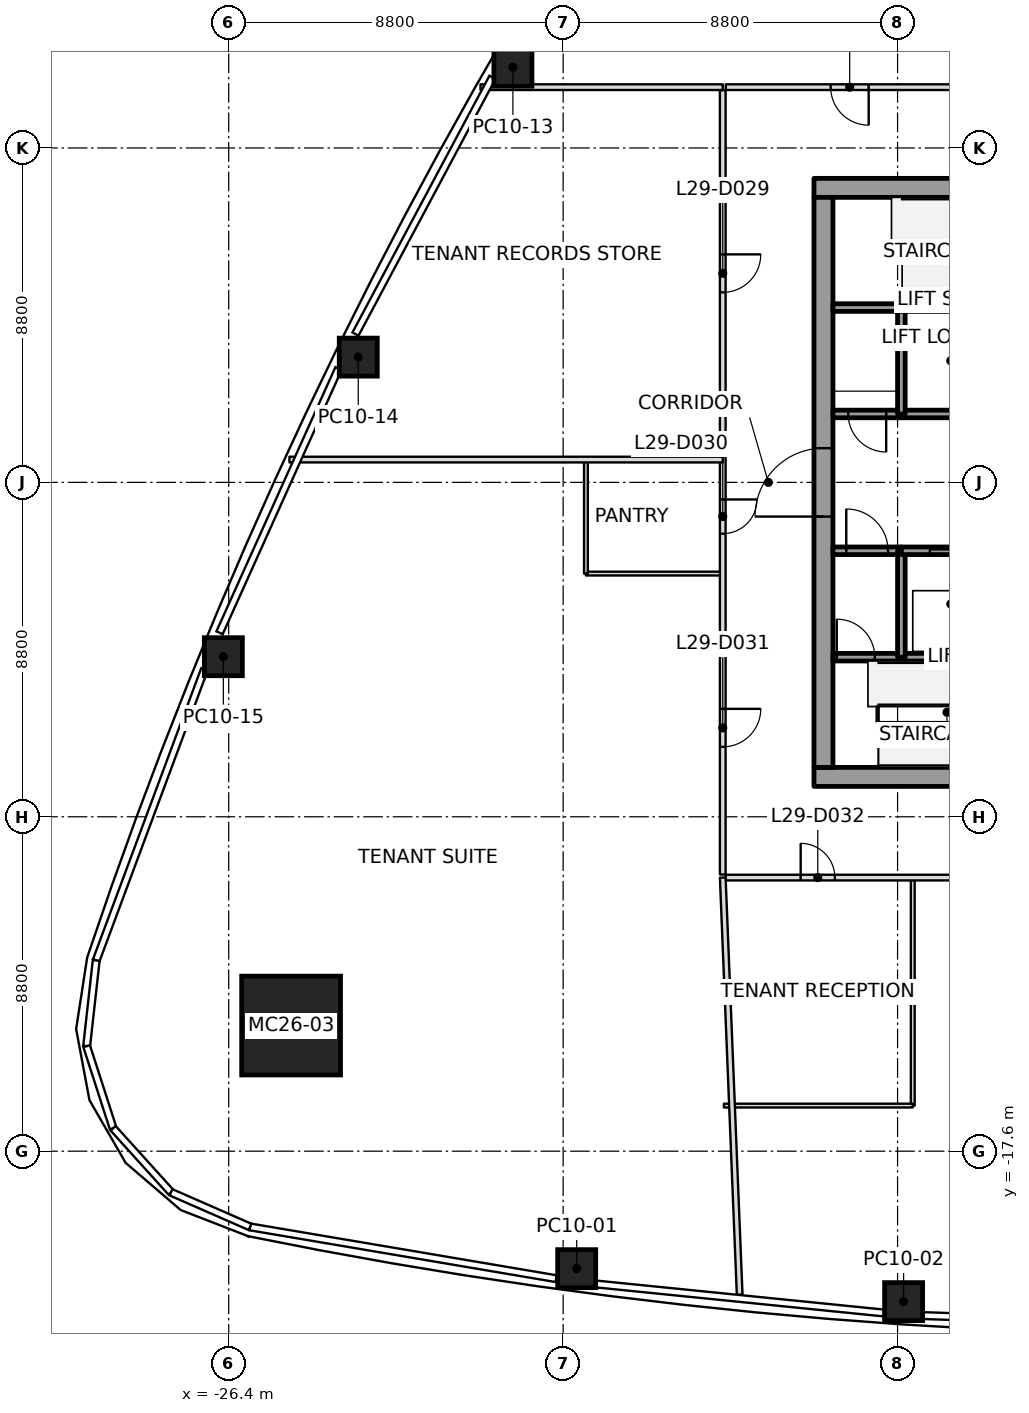
"""IFC4 building model, lengths in metres.
Left out: names, types, materials, properties, quantities, classifications, styles, units other than length and angle.
Written with IfcOpenShell. Run it as: python <this file> out.ifc"""

import sys

from ifc_helpers import new_model, si_unit, direction, frame, frame_2d, origin, origin_2d, place, context, subcontext, project, spatial, rectangle, extrude, element, fill, save


model = new_model("IFC4")
c1 = context("Model", 3, precision=1e-05, world=origin(), true_north=direction((0.0, 1.0)))
c2 = subcontext(c1, "Body", "Model", "MODEL_VIEW")
j1 = project(units=[si_unit("LENGTHUNIT", "METRE"), si_unit("PLANEANGLEUNIT", "RADIAN")], contexts=[c1])
p1 = place(None, origin())
s1 = spatial("IfcSite", under=j1, at=p1, CompositionType="ELEMENT")
p2 = place(p1, origin())
s2 = spatial("IfcBuilding", under=s1, at=p2, CompositionType="ELEMENT")
p3 = place(p2, frame((0.0, 0.0, 137.8)))
s3 = spatial("IfcBuildingStorey", under=s2, at=p3, CompositionType="ELEMENT", Elevation=137.8)
p4 = place(p3, frame((-24.758, -14.294, 0.0), z_axis=(0.02806141744, 0.01622681965, 0.999474485505), x_axis=(0.999606200887, -0.000455526946, -0.028057719863)))
e1 = element("IfcColumn", 1, at=p4, inside=s3, PredefinedType="COLUMN", context=c2, shape_type="SweptSolid", body=[
    extrude(rectangle(XDim=2.6, YDim=2.6, at=origin_2d()), origin(), (0.0, 0.0, 1.0), 4.002),
])
p5 = place(p3, frame((-17.243, -20.691, 0.0), z_axis=(0.017696459735, 0.010434809016, 0.999788952766), x_axis=(-0.990875185818, 0.133812553022, 0.016142081135)))
e2 = element("IfcColumn", 2, at=p5, inside=s3, PredefinedType="COLUMN", context=c2, shape_type="SweptSolid", body=[
    extrude(rectangle(XDim=1.0, YDim=1.0, at=origin_2d()), origin(), (0.0, 0.0, 1.0), 4.001),
])
p6 = place(p3, frame((-8.641, -21.559, 0.0), z_axis=(0.008849199152, 0.01116829962, 0.999898475225), x_axis=(-0.997716007081, 0.067063175126, 0.008080826415)))
e3 = element("IfcColumn", 3, at=p6, inside=s3, PredefinedType="COLUMN", context=c2, shape_type="SweptSolid", body=[
    extrude(rectangle(XDim=1.0, YDim=1.0, at=origin_2d()), origin(), (0.0, 0.0, 1.0), 4.0),
])
p7 = place(p3, frame((-18.921, 10.924, 0.0), z_axis=(0.009887049298, -0.00573692984, 0.999934664812), x_axis=(0.499975560967, 0.866039512843, 2.5126546e-05)))
e4 = element("IfcColumn", 4, at=p7, inside=s3, PredefinedType="COLUMN", context=c2, shape_type="SweptSolid", body=[
    extrude(rectangle(XDim=1.0, YDim=1.0, at=origin_2d()), origin(), (0.0, 0.0, 1.0), 4.0),
])
p8 = place(p3, frame((-22.991, 3.296, 0.0), z_axis=(0.014158706356, 0.002074982828, 0.999897607498), x_axis=(0.440836713602, 0.897550724125, -0.008104909801)))
e5 = element("IfcColumn", 5, at=p8, inside=s3, PredefinedType="COLUMN", context=c2, shape_type="SweptSolid", body=[
    extrude(rectangle(XDim=1.0, YDim=1.0, at=origin_2d()), origin(), (0.0, 0.0, 1.0), 4.0),
])
p9 = place(p3, frame((-26.541, -4.587, 0.0), z_axis=(0.017940538146, 0.010068669368, 0.999788357098), x_axis=(0.379721200807, 0.92496035973, -0.016128936303)))
e6 = element("IfcColumn", 6, at=p9, inside=s3, PredefinedType="COLUMN", context=c2, shape_type="SweptSolid", body=[
    extrude(rectangle(XDim=1.0, YDim=1.0, at=origin_2d()), origin(), (0.0, 0.0, 1.0), 4.001),
])
p10 = place(p3, frame((-11.0, -7.75, 0.0), z_axis=(0.0, 0.0, 1.0), x_axis=(1.0, 0.0, 0.0)))
e7 = element("IfcWall", 7, at=p10, inside=s3, PredefinedType="SHEAR", context=c2, shape_type="SweptSolid", body=[
    extrude(rectangle(XDim=22.0, YDim=0.5, at=frame_2d((11.0, 0.0))), origin(), (0.0, 0.0, 1.0), 4.0),
])
p11 = place(p10, frame((10.45, 0.0, 0.0)))
e8 = element("IfcOpeningElement", 8, at=p11, cuts=e7, PredefinedType="OPENING", context=c2, shape_type="SweptSolid", body=[
    extrude(rectangle(XDim=1.1, YDim=2.1, at=frame_2d((0.55, 1.05))), frame((0.0, 0.25, 0.0), z_axis=(0.0, -1.0, 0.0), x_axis=(1.0, 0.0, 0.0)), (0.0, 0.0, 1.0), 0.5),
])
p12 = place(p3, frame((-11.0, 7.75, 0.0), z_axis=(0.0, 0.0, 1.0), x_axis=(1.0, 0.0, 0.0)))
e9 = element("IfcWall", 9, at=p12, inside=s3, PredefinedType="SHEAR", context=c2, shape_type="SweptSolid", body=[
    extrude(rectangle(XDim=22.0, YDim=0.5, at=frame_2d((11.0, 0.0))), origin(), (0.0, 0.0, 1.0), 4.0),
])
p13 = place(p12, frame((10.45, 0.0, 0.0)))
e10 = element("IfcOpeningElement", 10, at=p13, cuts=e9, PredefinedType="OPENING", context=c2, shape_type="SweptSolid", body=[
    extrude(rectangle(XDim=1.1, YDim=2.1, at=frame_2d((0.55, 1.05))), frame((0.0, 0.25, 0.0), z_axis=(0.0, -1.0, 0.0), x_axis=(1.0, 0.0, 0.0)), (0.0, 0.0, 1.0), 0.5),
])
p14 = place(p3, frame((-10.75, -7.5, 0.0), z_axis=(0.0, 0.0, 1.0), x_axis=(0.0, 1.0, 0.0)))
e11 = element("IfcWall", 11, at=p14, inside=s3, PredefinedType="SHEAR", context=c2, shape_type="SweptSolid", body=[
    extrude(rectangle(XDim=15.0, YDim=0.5, at=frame_2d((7.5, 0.0))), origin(), (0.0, 0.0, 1.0), 4.0),
])
p15 = place(p14, frame((6.6, 0.0, 0.0)))
e12 = element("IfcOpeningElement", 12, at=p15, cuts=e11, PredefinedType="OPENING", context=c2, shape_type="SweptSolid", body=[
    extrude(rectangle(XDim=1.8, YDim=2.1, at=frame_2d((0.9, 1.05))), frame((0.0, 0.25, 0.0), z_axis=(0.0, -1.0, 0.0), x_axis=(1.0, 0.0, 0.0)), (0.0, 0.0, 1.0), 0.5),
])
p16 = place(p3, frame((-10.5, -4.6, 0.0), z_axis=(0.0, 0.0, 1.0), x_axis=(1.0, 0.0, 0.0)))
e13 = element("IfcWall", 13, at=p16, inside=s3, PredefinedType="SOLIDWALL", context=c2, shape_type="SweptSolid", body=[
    extrude(rectangle(XDim=1.8, YDim=0.2, at=frame_2d((0.9, 0.0))), origin(), (0.0, 0.0, 1.0), 3.85),
])
p17 = place(p16, frame((0.1, 0.0, 0.0)))
e14 = element("IfcOpeningElement", 14, at=p17, cuts=e13, PredefinedType="OPENING", context=c2, shape_type="SweptSolid", body=[
    extrude(rectangle(XDim=1.0, YDim=2.1, at=frame_2d((0.5, 1.05))), frame((0.0, 0.1, 0.0), z_axis=(0.0, -1.0, 0.0), x_axis=(1.0, 0.0, 0.0)), (0.0, 0.0, 1.0), 0.2),
])
p18 = place(p3, frame((-10.5, -1.8, 0.0), z_axis=(0.0, 0.0, 1.0), x_axis=(1.0, 0.0, 0.0)))
e15 = element("IfcWall", 15, at=p18, inside=s3, PredefinedType="SOLIDWALL", context=c2, shape_type="SweptSolid", body=[
    extrude(rectangle(XDim=1.8, YDim=0.2, at=frame_2d((0.9, 0.0))), origin(), (0.0, 0.0, 1.0), 3.85),
])
p19 = place(p18, frame((0.35, 0.0, 0.0)))
e16 = element("IfcOpeningElement", 16, at=p19, cuts=e15, PredefinedType="OPENING", context=c2, shape_type="SweptSolid", body=[
    extrude(rectangle(XDim=1.1, YDim=2.1, at=frame_2d((0.55, 1.05))), frame((0.0, 0.1, 0.0), z_axis=(0.0, -1.0, 0.0), x_axis=(1.0, 0.0, 0.0)), (0.0, 0.0, 1.0), 0.2),
])
p20 = place(p3, frame((-8.7, 1.8, 0.0), z_axis=(0.0, 0.0, 1.0), x_axis=(-1.0, 0.0, 0.0)))
e17 = element("IfcWall", 17, at=p20, inside=s3, PredefinedType="SOLIDWALL", context=c2, shape_type="SweptSolid", body=[
    extrude(rectangle(XDim=1.8, YDim=0.2, at=frame_2d((0.9, 0.0))), origin(), (0.0, 0.0, 1.0), 3.85),
])
p21 = place(p20, frame((0.4, 0.0, 0.0)))
e18 = element("IfcOpeningElement", 18, at=p21, cuts=e17, PredefinedType="OPENING", context=c2, shape_type="SweptSolid", body=[
    extrude(rectangle(XDim=1.0, YDim=2.1, at=frame_2d((0.5, 1.05))), frame((0.0, 0.1, 0.0), z_axis=(0.0, -1.0, 0.0), x_axis=(1.0, 0.0, 0.0)), (0.0, 0.0, 1.0), 0.2),
])
p22 = place(p3, frame((-8.7, 4.6, 0.0), z_axis=(0.0, 0.0, 1.0), x_axis=(-1.0, 0.0, 0.0)))
e19 = element("IfcWall", 19, at=p22, inside=s3, PredefinedType="SOLIDWALL", context=c2, shape_type="SweptSolid", body=[
    extrude(rectangle(XDim=1.8, YDim=0.2, at=frame_2d((0.9, 0.0))), origin(), (0.0, 0.0, 1.0), 3.85),
])
p23 = place(p3, frame((-8.7, -4.6, 0.0), z_axis=(0.0, 0.0, 1.0), x_axis=(1.0, 0.0, 0.0)))
e20 = element("IfcWall", 20, at=p23, inside=s3, PredefinedType="SOLIDWALL", context=c2, shape_type="SweptSolid", body=[
    extrude(rectangle(XDim=2.6, YDim=0.2, at=frame_2d((1.3, 0.0))), origin(), (0.0, 0.0, 1.0), 3.85),
])
p24 = place(p3, frame((-8.7, -4.6, 0.0), z_axis=(0.0, 0.0, 1.0), x_axis=(0.0, 1.0, 0.0)))
e21 = element("IfcWall", 21, at=p24, inside=s3, PredefinedType="SOLIDWALL", context=c2, shape_type="SweptSolid", body=[
    extrude(rectangle(XDim=2.8, YDim=0.2, at=frame_2d((1.4, 0.0))), origin(), (0.0, 0.0, 1.0), 3.85),
])
p25 = place(p3, frame((-8.7, -1.8, 0.0), z_axis=(0.0, 0.0, 1.0), x_axis=(1.0, 0.0, 0.0)))
e22 = element("IfcWall", 22, at=p25, inside=s3, PredefinedType="SOLIDWALL", context=c2, shape_type="SweptSolid", body=[
    extrude(rectangle(XDim=2.6, YDim=0.2, at=frame_2d((1.3, 0.0))), origin(), (0.0, 0.0, 1.0), 3.85),
])
p26 = place(p25, frame((0.75, 0.0, 0.0)))
e23 = element("IfcOpeningElement", 23, at=p26, cuts=e22, PredefinedType="OPENING", context=c2, shape_type="SweptSolid", body=[
    extrude(rectangle(XDim=1.1, YDim=2.1, at=frame_2d((0.55, 1.05))), frame((0.0, 0.1, 0.0), z_axis=(0.0, -1.0, 0.0), x_axis=(1.0, 0.0, 0.0)), (0.0, 0.0, 1.0), 0.2),
])
p27 = place(p3, frame((-6.1, 1.8, 0.0), z_axis=(0.0, 0.0, 1.0), x_axis=(-1.0, 0.0, 0.0)))
e24 = element("IfcWall", 24, at=p27, inside=s3, PredefinedType="SOLIDWALL", context=c2, shape_type="SweptSolid", body=[
    extrude(rectangle(XDim=2.6, YDim=0.2, at=frame_2d((1.3, 0.0))), origin(), (0.0, 0.0, 1.0), 3.85),
])
p28 = place(p3, frame((-8.7, 1.8, 0.0), z_axis=(0.0, 0.0, 1.0), x_axis=(0.0, 1.0, 0.0)))
e25 = element("IfcWall", 25, at=p28, inside=s3, PredefinedType="SOLIDWALL", context=c2, shape_type="SweptSolid", body=[
    extrude(rectangle(XDim=2.8, YDim=0.2, at=frame_2d((1.4, 0.0))), origin(), (0.0, 0.0, 1.0), 3.85),
])
p29 = place(p3, frame((-6.1, 4.6, 0.0), z_axis=(0.0, 0.0, 1.0), x_axis=(-1.0, 0.0, 0.0)))
e26 = element("IfcWall", 26, at=p29, inside=s3, PredefinedType="SOLIDWALL", context=c2, shape_type="SweptSolid", body=[
    extrude(rectangle(XDim=2.6, YDim=0.2, at=frame_2d((1.3, 0.0))), origin(), (0.0, 0.0, 1.0), 3.85),
])
p30 = place(p3, frame((-13.4, 0.6, 0.0), z_axis=(0.0, 0.0, 1.0), x_axis=(-1.0, 0.0, 0.0)))
e27 = element("IfcWall", 27, at=p30, inside=s3, PredefinedType="PARTITIONING", context=c2, shape_type="SweptSolid", body=[
    extrude(rectangle(XDim=11.402, YDim=0.15, at=frame_2d((5.701, 0.0))), origin(), (0.0, 0.0, 1.0), 3.234),
])
p31 = place(p3, frame((-13.4, 10.4, 0.0), z_axis=(0.0, 0.0, 1.0), x_axis=(-1.0, 0.0, 0.0)))
e28 = element("IfcWall", 28, at=p31, inside=s3, PredefinedType="PARTITIONING", context=c2, shape_type="SweptSolid", body=[
    extrude(rectangle(XDim=6.374, YDim=0.15, at=frame_2d((3.187, 0.0))), origin(), (0.0, 0.0, 1.0), 3.234),
])
p32 = place(p3, frame((-13.4, -10.4, 0.0), z_axis=(0.0, 0.0, 1.0), x_axis=(0.040518361505, -0.999178794001, 0.0)))
e29 = element("IfcWall", 29, at=p32, inside=s3, PredefinedType="PARTITIONING", context=c2, shape_type="SweptSolid", body=[
    extrude(rectangle(XDim=10.984, YDim=0.15, at=frame_2d((5.492, 0.0))), origin(), (0.0, 0.0, 1.0), 3.234),
])
p33 = place(p3, frame((-13.4, 10.32, 0.0), z_axis=(0.0, 0.0, 1.0), x_axis=(0.0, -1.0, 0.0)))
e30 = element("IfcWall", 30, at=p33, inside=s3, PredefinedType="PARTITIONING", context=c2, shape_type="SweptSolid", body=[
    extrude(rectangle(XDim=20.64, YDim=0.15, at=frame_2d((10.32, 0.0))), origin(), (0.0, 0.0, 1.0), 3.166),
])
p34 = place(p33, frame((4.32, 0.0, 0.0)))
e31 = element("IfcOpeningElement", 31, at=p34, cuts=e30, PredefinedType="OPENING", context=c2, shape_type="SweptSolid", body=[
    extrude(rectangle(XDim=1.0, YDim=2.1, at=frame_2d((0.5, 1.05))), frame((0.0, 0.075, 0.0), z_axis=(0.0, -1.0, 0.0), x_axis=(1.0, 0.0, 0.0)), (0.0, 0.0, 1.0), 0.15),
])
p35 = place(p33, frame((10.77, 0.0, 0.0)))
e32 = element("IfcOpeningElement", 32, at=p35, cuts=e30, PredefinedType="OPENING", context=c2, shape_type="SweptSolid", body=[
    extrude(rectangle(XDim=0.9, YDim=2.1, at=frame_2d((0.45, 1.05))), frame((0.0, 0.075, 0.0), z_axis=(0.0, -1.0, 0.0), x_axis=(1.0, 0.0, 0.0)), (0.0, 0.0, 1.0), 0.15),
])
p36 = place(p33, frame((16.28, 0.0, 0.0)))
e33 = element("IfcOpeningElement", 33, at=p36, cuts=e30, PredefinedType="OPENING", context=c2, shape_type="SweptSolid", body=[
    extrude(rectangle(XDim=1.0, YDim=2.1, at=frame_2d((0.5, 1.05))), frame((0.0, 0.075, 0.0), z_axis=(0.0, -1.0, 0.0), x_axis=(1.0, 0.0, 0.0)), (0.0, 0.0, 1.0), 0.15),
])
p37 = place(p3, frame((-13.32, -10.4, 0.0), z_axis=(0.0, 0.0, 1.0), x_axis=(1.0, 0.0, 0.0)))
e34 = element("IfcWall", 34, at=p37, inside=s3, PredefinedType="PARTITIONING", context=c2, shape_type="SweptSolid", body=[
    extrude(rectangle(XDim=26.64, YDim=0.15, at=frame_2d((13.32, 0.0))), origin(), (0.0, 0.0, 1.0), 3.3),
])
p38 = place(p37, frame((1.97, 0.0, 0.0)))
e35 = element("IfcOpeningElement", 35, at=p38, cuts=e34, PredefinedType="OPENING", context=c2, shape_type="SweptSolid", body=[
    extrude(rectangle(XDim=0.9, YDim=2.1, at=frame_2d((0.45, 1.05))), frame((0.0, 0.075, 0.0), z_axis=(0.0, -1.0, 0.0), x_axis=(1.0, 0.0, 0.0)), (0.0, 0.0, 1.0), 0.15),
])
p39 = place(p37, frame((9.87, 0.0, 0.0)))
e36 = element("IfcOpeningElement", 36, at=p39, cuts=e34, PredefinedType="OPENING", context=c2, shape_type="SweptSolid", body=[
    extrude(rectangle(XDim=1.0, YDim=2.1, at=frame_2d((0.5, 1.05))), frame((0.0, 0.075, 0.0), z_axis=(0.0, -1.0, 0.0), x_axis=(1.0, 0.0, 0.0)), (0.0, 0.0, 1.0), 0.15),
])
p40 = place(p37, frame((20.72, 0.0, 0.0)))
e37 = element("IfcOpeningElement", 37, at=p40, cuts=e34, PredefinedType="OPENING", context=c2, shape_type="SweptSolid", body=[
    extrude(rectangle(XDim=1.0, YDim=2.1, at=frame_2d((0.5, 1.05))), frame((0.0, 0.075, 0.0), z_axis=(0.0, -1.0, 0.0), x_axis=(1.0, 0.0, 0.0)), (0.0, 0.0, 1.0), 0.15),
])
p41 = place(p3, frame((13.32, 10.4, 0.0), z_axis=(0.0, 0.0, 1.0), x_axis=(-1.0, 0.0, 0.0)))
e38 = element("IfcWall", 38, at=p41, inside=s3, PredefinedType="PARTITIONING", context=c2, shape_type="SweptSolid", body=[
    extrude(rectangle(XDim=26.64, YDim=0.15, at=frame_2d((13.32, 0.0))), origin(), (0.0, 0.0, 1.0), 3.097),
])
p42 = place(p41, frame((0.95, 0.0, 0.0)))
e39 = element("IfcOpeningElement", 39, at=p42, cuts=e38, PredefinedType="OPENING", context=c2, shape_type="SweptSolid", body=[
    extrude(rectangle(XDim=0.9, YDim=2.1, at=frame_2d((0.45, 1.05))), frame((0.0, 0.075, 0.0), z_axis=(0.0, -1.0, 0.0), x_axis=(1.0, 0.0, 0.0)), (0.0, 0.0, 1.0), 0.15),
])
p43 = place(p41, frame((8.86, 0.0, 0.0)))
e40 = element("IfcOpeningElement", 40, at=p43, cuts=e38, PredefinedType="OPENING", context=c2, shape_type="SweptSolid", body=[
    extrude(rectangle(XDim=1.0, YDim=2.1, at=frame_2d((0.5, 1.05))), frame((0.0, 0.075, 0.0), z_axis=(0.0, -1.0, 0.0), x_axis=(1.0, 0.0, 0.0)), (0.0, 0.0, 1.0), 0.15),
])
p44 = place(p41, frame((17.37, 0.0, 0.0)))
e41 = element("IfcOpeningElement", 41, at=p44, cuts=e38, PredefinedType="OPENING", context=c2, shape_type="SweptSolid", body=[
    extrude(rectangle(XDim=0.9, YDim=2.1, at=frame_2d((0.45, 1.05))), frame((0.0, 0.075, 0.0), z_axis=(0.0, -1.0, 0.0), x_axis=(1.0, 0.0, 0.0)), (0.0, 0.0, 1.0), 0.15),
])
p45 = place(p41, frame((22.88, 0.0, 0.0)))
e42 = element("IfcOpeningElement", 42, at=p45, cuts=e38, PredefinedType="OPENING", context=c2, shape_type="SweptSolid", body=[
    extrude(rectangle(XDim=1.0, YDim=2.1, at=frame_2d((0.5, 1.05))), frame((0.0, 0.075, 0.0), z_axis=(0.0, -1.0, 0.0), x_axis=(1.0, 0.0, 0.0)), (0.0, 0.0, 1.0), 0.15),
])
p46 = place(p3, frame((-13.43, -2.4, 0.0), z_axis=(0.0, 0.0, 1.0), x_axis=(-1.0, 0.0, 0.0)))
e43 = element("IfcWall", 43, at=p46, inside=s3, PredefinedType="PARTITIONING", context=c2, shape_type="SweptSolid", body=[
    extrude(rectangle(XDim=3.57, YDim=0.1, at=frame_2d((1.785, 0.0))), origin(), (0.0, 0.0, 1.0), 3.247),
])
p47 = place(p3, frame((-17.0, -2.4, 0.0), z_axis=(0.0, 0.0, 1.0), x_axis=(0.0, 1.0, 0.0)))
e44 = element("IfcWall", 44, at=p47, inside=s3, PredefinedType="PARTITIONING", context=c2, shape_type="SweptSolid", body=[
    extrude(rectangle(XDim=2.97, YDim=0.1, at=frame_2d((1.485, 0.0))), origin(), (0.0, 0.0, 1.0), 3.247),
])
p48 = place(p3, frame((-8.4, -10.43, 0.0), z_axis=(0.0, 0.0, 1.0), x_axis=(0.0, -1.0, 0.0)))
e45 = element("IfcWall", 45, at=p48, inside=s3, PredefinedType="PARTITIONING", context=c2, shape_type="SweptSolid", body=[
    extrude(rectangle(XDim=5.97, YDim=0.1, at=frame_2d((2.985, 0.0))), origin(), (0.0, 0.0, 1.0), 3.3),
])
p49 = place(p3, frame((-8.4, -16.4, 0.0), z_axis=(0.0, 0.0, 1.0), x_axis=(-1.0, 0.0, 0.0)))
e46 = element("IfcWall", 46, at=p49, inside=s3, PredefinedType="PARTITIONING", context=c2, shape_type="SweptSolid", body=[
    extrude(rectangle(XDim=4.97, YDim=0.1, at=frame_2d((2.485, 0.0))), origin(), (0.0, 0.0, 1.0), 3.3),
])
p50 = place(p45, origin())
e47 = element("IfcDoor", 47, at=p50, inside=s3, OperationType="SINGLE_SWING_LEFT", PredefinedType="DOOR", context=c2, shape_type="SweptSolid", body=[
    extrude(rectangle(XDim=1.0, YDim=2.1, at=frame_2d((0.5, 1.05))), frame((0.0, 0.025, 0.0), z_axis=(0.0, -1.0, 0.0), x_axis=(1.0, 0.0, 0.0)), (0.0, 0.0, 1.0), 0.05),
])
fill(e42, e47)
p51 = place(p34, origin())
e48 = element("IfcDoor", 48, at=p51, inside=s3, OperationType="SINGLE_SWING_LEFT", PredefinedType="DOOR", context=c2, shape_type="SweptSolid", body=[
    extrude(rectangle(XDim=1.0, YDim=2.1, at=frame_2d((0.5, 1.05))), frame((0.0, 0.025, 0.0), z_axis=(0.0, -1.0, 0.0), x_axis=(1.0, 0.0, 0.0)), (0.0, 0.0, 1.0), 0.05),
])
fill(e31, e48)
p52 = place(p35, origin())
e49 = element("IfcDoor", 49, at=p52, inside=s3, OperationType="SINGLE_SWING_LEFT", PredefinedType="DOOR", context=c2, shape_type="SweptSolid", body=[
    extrude(rectangle(XDim=0.9, YDim=2.1, at=frame_2d((0.45, 1.05))), frame((0.0, 0.025, 0.0), z_axis=(0.0, -1.0, 0.0), x_axis=(1.0, 0.0, 0.0)), (0.0, 0.0, 1.0), 0.05),
])
fill(e32, e49)
p53 = place(p36, origin())
e50 = element("IfcDoor", 50, at=p53, inside=s3, OperationType="SINGLE_SWING_RIGHT", PredefinedType="DOOR", context=c2, shape_type="SweptSolid", body=[
    extrude(rectangle(XDim=1.0, YDim=2.1, at=frame_2d((0.5, 1.05))), frame((0.0, 0.025, 0.0), z_axis=(0.0, -1.0, 0.0), x_axis=(1.0, 0.0, 0.0)), (0.0, 0.0, 1.0), 0.05),
])
fill(e33, e50)
p54 = place(p38, origin())
e51 = element("IfcDoor", 51, at=p54, inside=s3, OperationType="SINGLE_SWING_RIGHT", PredefinedType="DOOR", context=c2, shape_type="SweptSolid", body=[
    extrude(rectangle(XDim=0.9, YDim=2.1, at=frame_2d((0.45, 1.05))), frame((0.0, 0.025, 0.0), z_axis=(0.0, -1.0, 0.0), x_axis=(1.0, 0.0, 0.0)), (0.0, 0.0, 1.0), 0.05),
])
fill(e35, e51)
p55 = place(p26, origin())
e52 = element("IfcDoor", 52, at=p55, inside=s3, OperationType="SLIDING_TO_LEFT", PredefinedType="DOOR", context=c2, shape_type="SweptSolid", body=[
    extrude(rectangle(XDim=1.1, YDim=2.1, at=frame_2d((0.55, 1.05))), frame((0.0, 0.025, 0.0), z_axis=(0.0, -1.0, 0.0), x_axis=(1.0, 0.0, 0.0)), (0.0, 0.0, 1.0), 0.05),
])
fill(e23, e52)
p56 = place(p19, origin())
e53 = element("IfcDoor", 53, at=p56, inside=s3, OperationType="SINGLE_SWING_RIGHT", PredefinedType="DOOR", context=c2, shape_type="SweptSolid", body=[
    extrude(rectangle(XDim=1.1, YDim=2.1, at=frame_2d((0.55, 1.05))), frame((0.0, 0.025, 0.0), z_axis=(0.0, -1.0, 0.0), x_axis=(1.0, 0.0, 0.0)), (0.0, 0.0, 1.0), 0.05),
])
fill(e16, e53)
p57 = place(p21, origin())
e54 = element("IfcDoor", 54, at=p57, inside=s3, OperationType="SINGLE_SWING_LEFT", PredefinedType="DOOR", context=c2, shape_type="SweptSolid", body=[
    extrude(rectangle(XDim=1.0, YDim=2.1, at=frame_2d((0.5, 1.05))), frame((0.0, 0.025, 0.0), z_axis=(0.0, -1.0, 0.0), x_axis=(1.0, 0.0, 0.0)), (0.0, 0.0, 1.0), 0.05),
])
fill(e18, e54)
p58 = place(p17, origin())
e55 = element("IfcDoor", 55, at=p58, inside=s3, OperationType="SINGLE_SWING_LEFT", PredefinedType="DOOR", context=c2, shape_type="SweptSolid", body=[
    extrude(rectangle(XDim=1.0, YDim=2.1, at=frame_2d((0.5, 1.05))), frame((0.0, 0.025, 0.0), z_axis=(0.0, -1.0, 0.0), x_axis=(1.0, 0.0, 0.0)), (0.0, 0.0, 1.0), 0.05),
])
fill(e14, e55)
p59 = place(p15, origin())
e56 = element("IfcDoor", 56, at=p59, inside=s3, OperationType="DOUBLE_DOOR_SINGLE_SWING", PredefinedType="DOOR", context=c2, shape_type="SweptSolid", body=[
    extrude(rectangle(XDim=1.8, YDim=2.1, at=frame_2d((0.9, 1.05))), frame((0.0, 0.025, 0.0), z_axis=(0.0, -1.0, 0.0), x_axis=(1.0, 0.0, 0.0)), (0.0, 0.0, 1.0), 0.05),
])
fill(e12, e56)
save(model, sys.argv[1])
